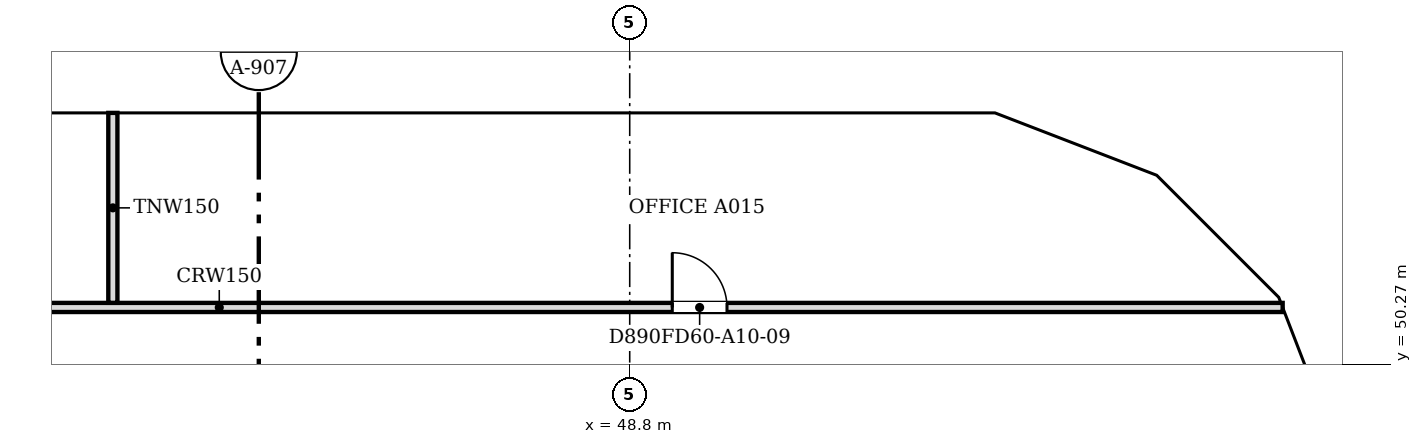
"""IFC4 building model, lengths in metres.
Left out: names, types, materials, properties, quantities, classifications, styles, units other than length and angle.
Written with IfcOpenShell. Run it as: python <this file> out.ifc"""

import sys

from ifc_helpers import new_model, si_unit, direction, frame, frame_2d, origin, place, context, subcontext, project, spatial, polyline, rectangle, outline, extrude, faceted_brep, source, transform, mapped, element, fill, save


model = new_model("IFC4")
c1 = context("Model", 3, precision=1e-05, world=origin(), true_north=direction((0.0, 1.0)))
c2 = subcontext(c1, "Body", "Model", "MODEL_VIEW")
j1 = project(units=[si_unit("LENGTHUNIT", "METRE"), si_unit("PLANEANGLEUNIT", "RADIAN")], contexts=[c1])
p1 = place(None, origin())
s1 = spatial("IfcSite", under=j1, at=p1, CompositionType="ELEMENT")
p2 = place(p1, origin())
s2 = spatial("IfcBuilding", under=s1, at=p2, CompositionType="ELEMENT")
p3 = place(p2, frame((0.0, 0.0, 120.2)))
s3 = spatial("IfcBuildingStorey", under=s2, at=p3, CompositionType="ELEMENT", Elevation=120.2)
m1 = source(origin(), c2, "Body", "Brep", [
    faceted_brep([(2.95, -0.25, 0.0), (3.003, -0.25, 0.068), (3.003, -0.25, 7.532), (2.95, -0.25, 7.6), (0.0, -0.25, 3.8), (0.047, 0.25, 3.86), (2.898, 0.25, 7.532), (2.898, 0.25, 0.068), (0.047, 0.25, 3.74), (2.95, 0.0, 0.0), (2.95, 0.0, 7.6), (0.0, 0.0, 3.8)], [[[0, 1, 2, 3, 4]], [[5, 6, 7, 8]], [[1, 0, 9]], [[10, 3, 2]], [[6, 5, 11, 4, 3, 10]], [[8, 7, 9, 0, 4, 11]], [[8, 11, 5]], [[1, 9, 7, 6, 10, 2]]]),
])
p4 = place(p3, frame((60.75, 48.753, -3.8), z_axis=(0.0, 0.0, 1.0), x_axis=(-0.35992665181, 0.932980602862, 0.0)))
e1 = element("IfcWall", 1, at=p4, inside=s3, PredefinedType="SOLIDWALL", context=c2, shape_type="MappedRepresentation", body=[
    mapped(m1, transform((0.0, 0.0, 0.0), scale=1.0)),
])
m2 = source(origin(), c2, "Body", "SweptSolid", [
    extrude(outline(polyline([(2.75, 6.935), (0.316, 3.8), (2.75, 0.665), (2.75, 6.935)])), frame((0.0, 0.26, 0.0), z_axis=(0.0, -1.0, 0.0), x_axis=(1.0, 0.0, 0.0)), (0.0, 0.0, 1.0), 0.52),
])
p5 = place(p4, origin())
e2 = element("IfcOpeningElement", 2, at=p5, cuts=e1, PredefinedType="OPENING", context=c2, shape_type="MappedRepresentation", body=[
    mapped(m2, transform((0.0, 0.0, 0.0), scale=1.0)),
])
m3 = source(origin(), c2, "Body", "Brep", [
    faceted_brep([(0.053, -0.25, 0.0), (2.997, -0.25, 3.8), (0.053, -0.25, 7.6), (0.0, -0.25, 7.532), (0.0, -0.25, 0.068), (0.106, 0.25, 7.532), (2.944, 0.25, 3.868), (2.944, 0.25, 3.732), (0.106, 0.25, 0.068), (2.997, 0.0, 3.8), (0.053, 0.0, 0.0), (0.053, 0.0, 7.6)], [[[0, 1, 2, 3, 4]], [[5, 6, 7, 8]], [[8, 7, 9, 1, 0, 10]], [[6, 5, 11, 2, 1, 9]], [[3, 2, 11]], [[10, 0, 4]], [[8, 10, 4, 3, 11, 5]], [[9, 7, 6]]]),
])
p6 = place(p3, frame((59.726, 51.469, -3.8), z_axis=(0.0, 0.0, 1.0), x_axis=(-0.707106781187, 0.707106781187, 0.0)))
e3 = element("IfcWall", 3, at=p6, inside=s3, PredefinedType="SOLIDWALL", context=c2, shape_type="MappedRepresentation", body=[
    mapped(m3, transform((0.0, 0.0, 0.0), scale=1.0)),
])
m4 = source(origin(), c2, "Body", "SweptSolid", [
    extrude(outline(polyline([(0.253, 0.667), (2.681, 3.8), (0.253, 6.934), (0.253, 0.667)])), frame((0.0, 0.26, 0.0), z_axis=(0.0, -1.0, 0.0), x_axis=(1.0, 0.0, 0.0)), (0.0, 0.0, 1.0), 0.52),
])
p7 = place(p6, origin())
e4 = element("IfcOpeningElement", 4, at=p7, cuts=e3, PredefinedType="OPENING", context=c2, shape_type="MappedRepresentation", body=[
    mapped(m4, transform((0.0, 0.0, 0.0), scale=1.0)),
])
m5 = source(origin(), c2, "Body", "Brep", [
    faceted_brep([(2.95, -0.25, 0.0), (2.997, -0.25, 0.059), (2.997, -0.25, 7.541), (2.95, -0.25, 7.6), (0.0, -0.25, 3.8), (0.053, 0.25, 3.868), (2.904, 0.25, 7.54), (2.904, 0.25, 0.06), (0.053, 0.25, 3.732), (2.95, 0.0, 0.0), (2.95, 0.0, 7.6), (0.0, 0.0, 3.8)], [[[0, 1, 2, 3, 4]], [[5, 6, 7, 8]], [[1, 0, 9]], [[10, 3, 2]], [[6, 5, 11, 4, 3, 10]], [[8, 7, 9, 0, 4, 11]], [[8, 11, 5]], [[1, 9, 7, 6, 10, 2]]]),
])
p8 = place(p3, frame((57.606, 53.588, -3.8), z_axis=(0.0, 0.0, 1.0), x_axis=(-0.932990326376, 0.359901446078, 0.0)))
e5 = element("IfcWall", 5, at=p8, inside=s3, PredefinedType="SOLIDWALL", context=c2, shape_type="MappedRepresentation", body=[
    mapped(m5, transform((0.0, 0.0, 0.0), scale=1.0)),
])
p9 = place(p8, origin())
e6 = element("IfcOpeningElement", 6, at=p9, cuts=e5, PredefinedType="OPENING", context=c2, shape_type="MappedRepresentation", body=[
    mapped(m2, transform((0.0, 0.0, 0.0), scale=1.0)),
])
m6 = source(origin(), c2, "Body", "Brep", [
    faceted_brep([(0.047, -0.25, 0.0), (3.05, -0.25, 3.8), (0.047, -0.25, 7.6), (0.0, -0.25, 7.54), (0.0, -0.25, 0.06), (0.093, 0.25, 7.541), (3.05, 0.25, 3.8), (0.093, 0.25, 0.059), (0.047, 0.0, 0.0), (0.047, 0.0, 7.6)], [[[0, 1, 2, 3, 4]], [[5, 6, 7]], [[7, 6, 1, 0, 8]], [[6, 5, 9, 2, 1]], [[3, 2, 9]], [[8, 0, 4]], [[7, 8, 4, 3, 9, 5]]]),
])
p10 = place(p3, frame((54.9, 54.65, -3.8), z_axis=(0.0, 0.0, 1.0), x_axis=(-1.0, 0.0, 0.0)))
e7 = element("IfcWall", 7, at=p10, inside=s3, PredefinedType="SOLIDWALL", context=c2, shape_type="MappedRepresentation", body=[
    mapped(m6, transform((0.0, 0.0, 0.0), scale=1.0)),
])
m7 = source(origin(), c2, "Body", "SweptSolid", [
    extrude(outline(polyline([(0.247, 0.656), (2.731, 3.8), (0.247, 6.944), (0.247, 0.656)])), frame((0.0, 0.26, 0.0), z_axis=(0.0, -1.0, 0.0), x_axis=(1.0, 0.0, 0.0)), (0.0, 0.0, 1.0), 0.52),
])
p11 = place(p10, origin())
e8 = element("IfcOpeningElement", 8, at=p11, cuts=e7, PredefinedType="OPENING", context=c2, shape_type="MappedRepresentation", body=[
    mapped(m7, transform((0.0, 0.0, 0.0), scale=1.0)),
])
m8 = source(origin(), c2, "Body", "SweptSolid", [
    extrude(outline(polyline([(3.05, 0.0), (6.1, 3.8), (3.05, 7.6), (0.0, 3.8), (3.05, 0.0)])), frame((0.0, 0.25, 0.0), z_axis=(0.0, -1.0, 0.0), x_axis=(1.0, 0.0, 0.0)), (0.0, 0.0, 1.0), 0.5),
])
p12 = place(p3, frame((51.85, 54.65, -3.8), z_axis=(0.0, 0.0, 1.0), x_axis=(-1.0, 0.0, 0.0)))
e9 = element("IfcWall", 9, at=p12, inside=s3, PredefinedType="SOLIDWALL", context=c2, shape_type="MappedRepresentation", body=[
    mapped(m8, transform((0.0, 0.0, 0.0), scale=1.0)),
])
m9 = source(origin(), c2, "Body", "SweptSolid", [
    extrude(outline(polyline([(3.05, 0.399), (5.78, 3.8), (3.05, 7.201), (0.321, 3.8), (3.05, 0.399)])), frame((0.0, 0.26, 0.0), z_axis=(0.0, -1.0, 0.0), x_axis=(1.0, 0.0, 0.0)), (0.0, 0.0, 1.0), 0.52),
])
p13 = place(p12, origin())
e10 = element("IfcOpeningElement", 10, at=p13, cuts=e9, PredefinedType="OPENING", context=c2, shape_type="MappedRepresentation", body=[
    mapped(m9, transform((0.0, 0.0, 0.0), scale=1.0)),
])
p14 = place(p3, frame((45.75, 54.65, -3.8), z_axis=(0.0, 0.0, 1.0), x_axis=(-1.0, 0.0, 0.0)))
e11 = element("IfcWall", 11, at=p14, inside=s3, PredefinedType="SOLIDWALL", context=c2, shape_type="MappedRepresentation", body=[
    mapped(m8, transform((0.0, 0.0, 0.0), scale=1.0)),
])
p15 = place(p14, origin())
e12 = element("IfcOpeningElement", 12, at=p15, cuts=e11, PredefinedType="OPENING", context=c2, shape_type="MappedRepresentation", body=[
    mapped(m9, transform((0.0, 0.0, 0.0), scale=1.0)),
])
m10 = source(origin(), c2, "Body", "Brep", [
    faceted_brep([(3.05, -0.25, 0.0), (6.1, -0.25, 3.8), (6.1, -0.25, 3.8), (3.05, -0.25, 7.6), (0.0, -0.25, 3.8), (0.0, 0.25, 3.8), (3.05, 0.25, 7.6), (6.1, 0.25, 3.8), (6.1, 0.25, 3.8), (3.05, 0.25, 0.0)], [[[0, 1, 2, 3, 4]], [[5, 6, 7, 8, 9]], [[9, 8, 1, 0]], [[7, 6, 3, 2]], [[6, 5, 4, 3]], [[5, 9, 0, 4]], [[1, 8, 7, 2]]]),
])
p16 = place(p3, frame((39.65, 54.65, -3.8), z_axis=(0.0, 0.0, 1.0), x_axis=(-1.0, 0.0, 0.0)))
e13 = element("IfcWall", 13, at=p16, inside=s3, PredefinedType="SOLIDWALL", context=c2, shape_type="MappedRepresentation", body=[
    mapped(m10, transform((0.0, 0.0, 0.0), scale=1.0)),
])
p17 = place(p16, origin())
e14 = element("IfcOpeningElement", 14, at=p17, cuts=e13, PredefinedType="OPENING", context=c2, shape_type="MappedRepresentation", body=[
    mapped(m9, transform((0.0, 0.0, 0.0), scale=1.0)),
])
p18 = place(p2, frame((0.0, 0.0, 124.0)))
s4 = spatial("IfcBuildingStorey", under=s2, at=p18, CompositionType="ELEMENT", Elevation=124.0)
m11 = source(origin(), c2, "Body", "Brep", [
    faceted_brep([(0.047, -0.25, 0.0), (2.997, -0.25, 3.8), (0.047, -0.25, 7.6), (0.0, -0.25, 7.541), (0.0, -0.25, 0.059), (0.093, 0.25, 7.54), (2.944, 0.25, 3.868), (2.944, 0.25, 3.732), (0.093, 0.25, 0.06), (2.997, 0.0, 3.8), (0.047, 0.0, 0.0), (0.047, 0.0, 7.6)], [[[0, 1, 2, 3, 4]], [[5, 6, 7, 8]], [[8, 7, 9, 1, 0, 10]], [[6, 5, 11, 2, 1, 9]], [[3, 2, 11]], [[10, 0, 4]], [[8, 10, 4, 3, 11, 5]], [[9, 7, 6]]]),
])
p19 = place(p18, frame((60.767, 48.71, -3.8), z_axis=(0.0, 0.0, 1.0), x_axis=(-0.359901446078, 0.932990326376, 0.0)))
e15 = element("IfcWall", 15, at=p19, inside=s4, PredefinedType="SOLIDWALL", context=c2, shape_type="MappedRepresentation", body=[
    mapped(m11, transform((0.0, 0.0, 0.0), scale=1.0)),
])
m12 = source(origin(), c2, "Body", "SweptSolid", [
    extrude(outline(polyline([(0.247, 0.665), (2.681, 3.8), (0.247, 6.935), (0.247, 0.665)])), frame((0.0, 0.26, 0.0), z_axis=(0.0, -1.0, 0.0), x_axis=(1.0, 0.0, 0.0)), (0.0, 0.0, 1.0), 0.52),
])
p20 = place(p19, origin())
e16 = element("IfcOpeningElement", 16, at=p20, cuts=e15, PredefinedType="OPENING", context=c2, shape_type="MappedRepresentation", body=[
    mapped(m12, transform((0.0, 0.0, 0.0), scale=1.0)),
])
m13 = source(origin(), c2, "Body", "Brep", [
    faceted_brep([(2.944, -0.25, 0.0), (2.997, -0.25, 0.068), (2.997, -0.25, 7.532), (2.944, -0.25, 7.6), (0.0, -0.25, 3.8), (0.053, 0.25, 3.868), (2.891, 0.25, 7.532), (2.891, 0.25, 0.068), (0.053, 0.25, 3.732), (2.944, 0.0, 0.0), (2.944, 0.0, 7.6), (0.0, 0.0, 3.8)], [[[0, 1, 2, 3, 4]], [[5, 6, 7, 8]], [[1, 0, 9]], [[10, 3, 2]], [[6, 5, 11, 4, 3, 10]], [[8, 7, 9, 0, 4, 11]], [[8, 11, 5]], [[1, 9, 7, 6, 10, 2]]]),
])
p21 = place(p18, frame((59.688, 51.506, -3.8), z_axis=(0.0, 0.0, 1.0), x_axis=(-0.707106781187, 0.707106781187, 0.0)))
e17 = element("IfcWall", 17, at=p21, inside=s4, PredefinedType="SOLIDWALL", context=c2, shape_type="MappedRepresentation", body=[
    mapped(m13, transform((0.0, 0.0, 0.0), scale=1.0)),
])
m14 = source(origin(), c2, "Body", "SweptSolid", [
    extrude(outline(polyline([(2.744, 6.934), (0.316, 3.8), (2.744, 0.666), (2.744, 6.934)])), frame((0.0, 0.26, 0.0), z_axis=(0.0, -1.0, 0.0), x_axis=(1.0, 0.0, 0.0)), (0.0, 0.0, 1.0), 0.52),
])
p22 = place(p21, origin())
e18 = element("IfcOpeningElement", 18, at=p22, cuts=e17, PredefinedType="OPENING", context=c2, shape_type="MappedRepresentation", body=[
    mapped(m14, transform((0.0, 0.0, 0.0), scale=1.0)),
])
m15 = source(origin(), c2, "Body", "Brep", [
    faceted_brep([(0.053, -0.25, 0.0), (3.003, -0.25, 3.8), (0.053, -0.25, 7.6), (0.0, -0.25, 7.532), (0.0, -0.25, 0.068), (0.106, 0.25, 7.532), (2.957, 0.25, 3.86), (2.957, 0.25, 3.74), (0.106, 0.25, 0.068), (3.003, 0.0, 3.8), (0.053, 0.0, 0.0), (0.053, 0.0, 7.6)], [[[0, 1, 2, 3, 4]], [[5, 6, 7, 8]], [[8, 7, 9, 1, 0, 10]], [[6, 5, 11, 2, 1, 9]], [[3, 2, 11]], [[10, 0, 4]], [[8, 10, 4, 3, 11, 5]], [[9, 7, 6]]]),
])
p23 = place(p18, frame((57.656, 53.569, -3.8), z_axis=(0.0, 0.0, 1.0), x_axis=(-0.933007896601, 0.359855894603, 0.0)))
e19 = element("IfcWall", 19, at=p23, inside=s4, PredefinedType="SOLIDWALL", context=c2, shape_type="MappedRepresentation", body=[
    mapped(m15, transform((0.0, 0.0, 0.0), scale=1.0)),
])
m16 = source(origin(), c2, "Body", "SweptSolid", [
    extrude(outline(polyline([(0.253, 0.665), (2.687, 3.8), (0.253, 6.935), (0.253, 0.665)])), frame((0.0, 0.26, 0.0), z_axis=(0.0, -1.0, 0.0), x_axis=(1.0, 0.0, 0.0)), (0.0, 0.0, 1.0), 0.52),
])
p24 = place(p23, origin())
e20 = element("IfcOpeningElement", 20, at=p24, cuts=e19, PredefinedType="OPENING", context=c2, shape_type="MappedRepresentation", body=[
    mapped(m16, transform((0.0, 0.0, 0.0), scale=1.0)),
])
m17 = source(origin(), c2, "Body", "Brep", [
    faceted_brep([(3.003, -0.25, 0.0), (6.053, -0.25, 3.8), (3.003, -0.25, 7.6), (0.0, -0.25, 3.8), (0.047, 0.25, 3.859), (3.003, 0.25, 7.6), (6.053, 0.25, 3.8), (3.003, 0.25, 0.0), (0.047, 0.25, 3.741), (0.0, 0.0, 3.8)], [[[0, 1, 2, 3]], [[4, 5, 6, 7, 8]], [[7, 6, 1, 0]], [[6, 5, 2, 1]], [[5, 4, 9, 3, 2]], [[8, 7, 0, 3, 9]], [[8, 9, 4]]]),
])
p25 = place(p18, frame((54.854, 54.65, -3.8), z_axis=(0.0, 0.0, 1.0), x_axis=(-1.0, 0.0, 0.0)))
e21 = element("IfcWall", 21, at=p25, inside=s4, PredefinedType="SOLIDWALL", context=c2, shape_type="MappedRepresentation", body=[
    mapped(m17, transform((0.0, 0.0, 0.0), scale=1.0)),
])
m18 = source(origin(), c2, "Body", "SweptSolid", [
    extrude(outline(polyline([(3.005, 0.401), (5.733, 3.8), (3.005, 7.199), (0.319, 3.8), (3.005, 0.401)])), frame((0.0, 0.26, 0.0), z_axis=(0.0, -1.0, 0.0), x_axis=(1.0, 0.0, 0.0)), (0.0, 0.0, 1.0), 0.52),
])
p26 = place(p25, origin())
e22 = element("IfcOpeningElement", 22, at=p26, cuts=e21, PredefinedType="OPENING", context=c2, shape_type="MappedRepresentation", body=[
    mapped(m18, transform((0.0, 0.0, 0.0), scale=1.0)),
])
p27 = place(p18, frame((48.8, 54.65, -3.8), z_axis=(0.0, 0.0, 1.0), x_axis=(-1.0, 0.0, 0.0)))
e23 = element("IfcWall", 23, at=p27, inside=s4, PredefinedType="SOLIDWALL", context=c2, shape_type="MappedRepresentation", body=[
    mapped(m8, transform((0.0, 0.0, 0.0), scale=1.0)),
])
p28 = place(p27, origin())
e24 = element("IfcOpeningElement", 24, at=p28, cuts=e23, PredefinedType="OPENING", context=c2, shape_type="MappedRepresentation", body=[
    mapped(m9, transform((0.0, 0.0, 0.0), scale=1.0)),
])
p29 = place(p18, frame((42.7, 54.65, -3.8), z_axis=(0.0, 0.0, 1.0), x_axis=(-1.0, 0.0, 0.0)))
e25 = element("IfcWall", 25, at=p29, inside=s4, PredefinedType="SOLIDWALL", context=c2, shape_type="MappedRepresentation", body=[
    mapped(m10, transform((0.0, 0.0, 0.0), scale=1.0)),
])
p30 = place(p29, origin())
e26 = element("IfcOpeningElement", 26, at=p30, cuts=e25, PredefinedType="OPENING", context=c2, shape_type="MappedRepresentation", body=[
    mapped(m9, transform((0.0, 0.0, 0.0), scale=1.0)),
])
p31 = place(p3, frame((28.1, 51.2, 0.0), z_axis=(0.0, 0.0, 1.0), x_axis=(1.0, 0.0, 0.0)))
e27 = element("IfcWall", 27, at=p31, inside=s3, PredefinedType="PARTITIONING", context=c2, shape_type="SweptSolid", body=[
    extrude(rectangle(XDim=31.438, YDim=0.15, at=frame_2d((15.719, 0.0))), origin(), (0.0, 0.0, 1.0), 3.067),
])
m19 = source(origin(), c2, "Body", "SweptSolid", [
    extrude(rectangle(XDim=0.9, YDim=2.1, at=frame_2d((0.45, 1.05))), frame((0.0, 0.085, 0.0), z_axis=(0.0, -1.0, 0.0), x_axis=(1.0, 0.0, 0.0)), (0.0, 0.0, 1.0), 0.17),
])
p32 = place(p31, frame((5.6, 0.0, 0.0)))
e28 = element("IfcOpeningElement", 28, at=p32, cuts=e27, PredefinedType="OPENING", context=c2, shape_type="MappedRepresentation", body=[
    mapped(m19, transform((0.0, 0.0, 0.0), scale=1.0)),
])
p33 = place(p31, frame((21.4, 0.0, 0.0)))
e29 = element("IfcOpeningElement", 29, at=p33, cuts=e27, PredefinedType="OPENING", context=c2, shape_type="MappedRepresentation", body=[
    mapped(m19, transform((0.0, 0.0, 0.0), scale=1.0)),
])
p34 = place(p3, frame((40.3, 51.276, 0.0), z_axis=(0.0, 0.0, 1.0), x_axis=(0.0, 1.0, 0.0)))
e30 = element("IfcWall", 30, at=p34, inside=s3, PredefinedType="PARTITIONING", context=c2, shape_type="SweptSolid", body=[
    extrude(rectangle(XDim=3.124, YDim=0.15, at=frame_2d((1.562, 0.0))), origin(), (0.0, 0.0, 1.0), 3.067),
])
m20 = source(origin(), c2, "Body", "SweptSolid", [
    extrude(rectangle(XDim=0.9, YDim=2.1, at=frame_2d((0.45, 1.05))), frame((0.0, 0.025, 0.0), z_axis=(0.0, -1.0, 0.0), x_axis=(1.0, 0.0, 0.0)), (0.0, 0.0, 1.0), 0.05),
])
p35 = place(p33, origin())
e31 = element("IfcDoor", 31, at=p35, inside=s3, OperationType="SINGLE_SWING_LEFT", PredefinedType="DOOR", context=c2, shape_type="MappedRepresentation", body=[
    mapped(m20, transform((0.0, 0.0, 0.0), scale=1.0)),
])
fill(e29, e31)
save(model, sys.argv[1])
